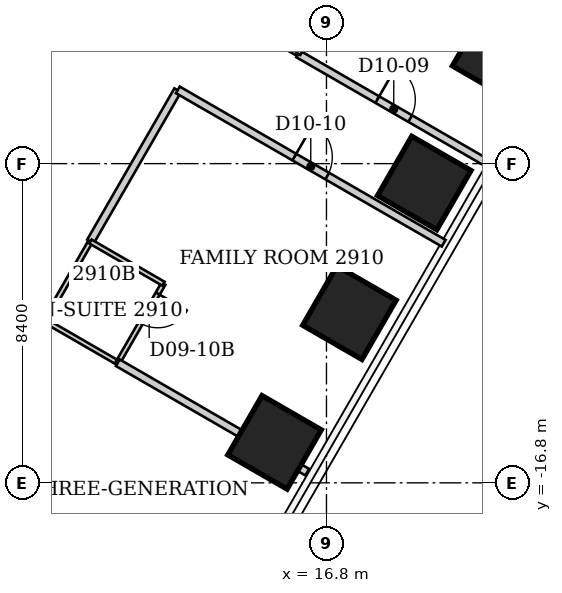
"""IFC4 building model, lengths in metres.
Left out: names, types, materials, properties, quantities, classifications, styles, units other than length and angle.
Written with IfcOpenShell. Run it as: python <this file> out.ifc"""

import sys

from ifc_helpers import new_model, si_unit, direction, frame, frame_2d, origin, origin_2d, place, context, subcontext, project, spatial, rectangle, extrude, element, fill, save


model = new_model("IFC4")
c1 = context("Model", 3, precision=1e-05, world=origin(), true_north=direction((0.0, 1.0)))
c2 = subcontext(c1, "Body", "Model", "MODEL_VIEW")
j1 = project(units=[si_unit("LENGTHUNIT", "METRE"), si_unit("PLANEANGLEUNIT", "RADIAN")], contexts=[c1])
p1 = place(None, origin())
s1 = spatial("IfcSite", under=j1, at=p1, CompositionType="ELEMENT")
p2 = place(p1, origin())
s2 = spatial("IfcBuilding", under=s1, at=p2, CompositionType="ELEMENT")
p3 = place(p2, frame((0.0, 0.0, 119.6)))
s3 = spatial("IfcBuildingStorey", under=s2, at=p3, CompositionType="ELEMENT", Elevation=119.6)
for number, where, z_axis, x_axis in (
    (1, (21.344, -5.499, 0.0), (0.0, 0.0, 1.0), (0.866, -0.5, 0.0)),
    (2, (19.374, -8.911, 0.0), (0.0, 0.0, 1.0), (0.866, -0.5, 0.0)),
    (3, (17.404, -12.323, 0.0), (0.0, 0.0, 1.0), (0.866, -0.5, 0.0)),
    (4, (15.434, -15.735, 0.0), (0.0, 0.0, 1.0), (0.866, -0.5, 0.0)),
):
    element("IfcColumn", number, at=place(p3, frame(where, z_axis=z_axis, x_axis=x_axis)), inside=s3, PredefinedType="COLUMN", context=c2, shape_type="SweptSolid", body=[
        extrude(rectangle(XDim=1.8, YDim=1.8, at=origin_2d()), origin(), (0.0, 0.0, 1.0), 3.8),
    ])
p4 = place(p3, frame((9.39, -12.53, 0.0), z_axis=(0.0, 0.0, 1.0), x_axis=(0.499769390944, 0.866158505053, 0.0)))
e5 = element("IfcWall", 5, at=p4, inside=s3, PredefinedType="PARTITIONING", context=c2, shape_type="SweptSolid", body=[
    extrude(rectangle(XDim=2.402, YDim=0.12, at=frame_2d((1.201, 0.0))), origin(), (0.0, 0.0, 1.0), 3.64),
])
p5 = place(p3, frame((9.39, -12.53, 0.0), z_axis=(0.0, 0.0, 1.0), x_axis=(0.865732595383, -0.500506816428, 0.0)))
e6 = element("IfcWall", 6, at=p5, inside=s3, PredefinedType="PARTITIONING", context=c2, shape_type="SweptSolid", body=[
    extrude(rectangle(XDim=2.218, YDim=0.12, at=frame_2d((1.109, 0.0))), origin(), (0.0, 0.0, 1.0), 3.64),
])
p6 = place(p3, frame((10.59, -10.45, 0.0), z_axis=(0.0, 0.0, 1.0), x_axis=(0.499408130876, 0.866366850021, 0.0)))
e7 = element("IfcWall", 7, at=p6, inside=s3, PredefinedType="PARTITIONING", context=c2, shape_type="SweptSolid", body=[
    extrude(rectangle(XDim=4.595, YDim=0.2, at=frame_2d((2.298, 0.0))), origin(), (0.0, 0.0, 1.0), 3.64),
])
p7 = place(p3, frame((11.31, -13.64, 0.0), z_axis=(0.0, 0.0, 1.0), x_axis=(0.499737123639, 0.866177122335, 0.0)))
e8 = element("IfcWall", 8, at=p7, inside=s3, PredefinedType="PARTITIONING", context=c2, shape_type="SweptSolid", body=[
    extrude(rectangle(XDim=2.401, YDim=0.12, at=frame_2d((1.201, 0.0))), origin(), (0.0, 0.0, 1.0), 3.64),
])
p8 = place(p7, frame((1.201, 0.0, 0.0)))
e9 = element("IfcOpeningElement", 9, at=p8, cuts=e8, PredefinedType="OPENING", context=c2, shape_type="SweptSolid", body=[
    extrude(rectangle(XDim=0.9, YDim=2.03, at=frame_2d((0.45, 1.015))), frame((0.0, 0.06, 0.0), z_axis=(0.0, -1.0, 0.0), x_axis=(1.0, 0.0, 0.0)), (0.0, 0.0, 1.0), 0.12),
])
p9 = place(p3, frame((11.31, -13.64, 0.0), z_axis=(0.0, 0.0, 1.0), x_axis=(0.865919350456, -0.50018364478, 0.0)))
e10 = element("IfcWall", 10, at=p9, inside=s3, PredefinedType="PARTITIONING", context=c2, shape_type="SweptSolid", body=[
    extrude(rectangle(XDim=5.758, YDim=0.2, at=frame_2d((2.879, 0.0))), origin(), (0.0, 0.0, 1.0), 3.64),
])
p10 = place(p3, frame((12.51, -11.56, 0.0), z_axis=(0.0, 0.0, 1.0), x_axis=(-0.865705017107, 0.500554515868, 0.0)))
e11 = element("IfcWall", 11, at=p10, inside=s3, PredefinedType="PARTITIONING", context=c2, shape_type="SweptSolid", body=[
    extrude(rectangle(XDim=2.218, YDim=0.12, at=frame_2d((1.109, 0.0))), origin(), (0.0, 0.0, 1.0), 3.64),
])
p11 = place(p3, frame((12.89, -6.46, 0.0), z_axis=(0.0, 0.0, 1.0), x_axis=(0.866181559118, -0.499729433437, 0.0)))
e12 = element("IfcWall", 12, at=p11, inside=s3, PredefinedType="PARTITIONING", context=c2, shape_type="SweptSolid", body=[
    extrude(rectangle(XDim=8.075, YDim=0.2, at=frame_2d((4.037, 0.0))), origin(), (0.0, 0.0, 1.0), 3.64),
])
p12 = place(p11, frame((3.537, 0.0, 0.0)))
e13 = element("IfcOpeningElement", 13, at=p12, cuts=e12, PredefinedType="OPENING", context=c2, shape_type="SweptSolid", body=[
    extrude(rectangle(XDim=1.0, YDim=2.13, at=frame_2d((0.5, 1.065))), frame((0.0, 0.1, 0.0), z_axis=(0.0, -1.0, 0.0), x_axis=(1.0, 0.0, 0.0)), (0.0, 0.0, 1.0), 0.2),
])
p13 = place(p3, frame((14.09, -4.38, 0.0), z_axis=(0.0, 0.0, 1.0), x_axis=(0.866151579213, -0.499781394038, 0.0)))
e14 = element("IfcWall", 14, at=p13, inside=s3, PredefinedType="PARTITIONING", context=c2, shape_type="SweptSolid", body=[
    extrude(rectangle(XDim=2.271, YDim=0.12, at=frame_2d((1.135, 0.0))), origin(), (0.0, 0.0, 1.0), 3.64),
])
p14 = place(p3, frame((16.057, -5.515, 0.0), z_axis=(0.0, 0.0, 1.0), x_axis=(0.866182784606, -0.499727309292, 0.0)))
e15 = element("IfcWall", 15, at=p14, inside=s3, PredefinedType="PARTITIONING", context=c2, shape_type="SweptSolid", body=[
    extrude(rectangle(XDim=5.803, YDim=0.2, at=frame_2d((2.902, 0.0))), origin(), (0.0, 0.0, 1.0), 3.64),
])
p15 = place(p14, frame((2.402, 0.0, 0.0)))
e16 = element("IfcOpeningElement", 16, at=p15, cuts=e15, PredefinedType="OPENING", context=c2, shape_type="SweptSolid", body=[
    extrude(rectangle(XDim=1.0, YDim=2.13, at=frame_2d((0.5, 1.065))), frame((0.0, 0.1, 0.0), z_axis=(0.0, -1.0, 0.0), x_axis=(1.0, 0.0, 0.0)), (0.0, 0.0, 1.0), 0.2),
])
p16 = place(p3, frame((16.06, -5.51, 0.0), z_axis=(0.0, 0.0, 1.0), x_axis=(0.498748634132, 0.866746675766, 0.0)))
e17 = element("IfcWall", 17, at=p16, inside=s3, PredefinedType="PARTITIONING", context=c2, shape_type="SweptSolid", body=[
    extrude(rectangle(XDim=2.446, YDim=0.12, at=frame_2d((1.223, 0.0))), origin(), (0.0, 0.0, 1.0), 3.64),
])
p17 = place(p16, frame((1.246, 0.0, 0.0)))
e18 = element("IfcOpeningElement", 18, at=p17, cuts=e17, PredefinedType="OPENING", context=c2, shape_type="SweptSolid", body=[
    extrude(rectangle(XDim=0.9, YDim=2.03, at=frame_2d((0.45, 1.015))), frame((0.0, 0.06, 0.0), z_axis=(0.0, -1.0, 0.0), x_axis=(1.0, 0.0, 0.0)), (0.0, 0.0, 1.0), 0.12),
])
p18 = place(p15, origin())
e19 = element("IfcDoor", 19, at=p18, inside=s3, OperationType="SINGLE_SWING_LEFT", PredefinedType="DOOR", context=c2, shape_type="SweptSolid", body=[
    extrude(rectangle(XDim=1.0, YDim=2.13, at=frame_2d((0.5, 1.065))), frame((0.0, 0.025, 0.0), z_axis=(0.0, -1.0, 0.0), x_axis=(1.0, 0.0, 0.0)), (0.0, 0.0, 1.0), 0.05),
])
fill(e16, e19)
p19 = place(p12, origin())
e20 = element("IfcDoor", 20, at=p19, inside=s3, OperationType="SINGLE_SWING_LEFT", PredefinedType="DOOR", context=c2, shape_type="SweptSolid", body=[
    extrude(rectangle(XDim=1.0, YDim=2.13, at=frame_2d((0.5, 1.065))), frame((0.0, 0.025, 0.0), z_axis=(0.0, -1.0, 0.0), x_axis=(1.0, 0.0, 0.0)), (0.0, 0.0, 1.0), 0.05),
])
fill(e13, e20)
p20 = place(p8, origin())
e21 = element("IfcDoor", 21, at=p20, inside=s3, OperationType="SINGLE_SWING_RIGHT", PredefinedType="DOOR", context=c2, shape_type="SweptSolid", body=[
    extrude(rectangle(XDim=0.9, YDim=2.03, at=frame_2d((0.45, 1.015))), frame((0.0, 0.025, 0.0), z_axis=(0.0, -1.0, 0.0), x_axis=(1.0, 0.0, 0.0)), (0.0, 0.0, 1.0), 0.05),
])
fill(e9, e21)
save(model, sys.argv[1])
